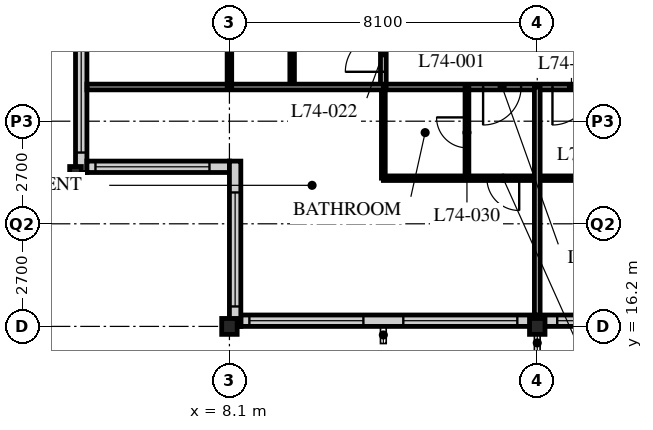
"""IFC4 building model, lengths in metres.
Left out: names, types, materials, properties, quantities, classifications, styles, units other than length and angle.
Written with IfcOpenShell. Run it as: python <this file> out.ifc"""

import sys

from ifc_helpers import new_model, si_unit, direction, frame, frame_2d, origin, origin_2d, place, context, subcontext, project, spatial, rectangle, i_section, extrude, element, fill, save


model = new_model("IFC4")
c1 = context("Model", 3, precision=1e-05, world=origin(), true_north=direction((0.0, 1.0)))
c2 = subcontext(c1, "Body", "Model", "MODEL_VIEW")
j1 = project(units=[si_unit("LENGTHUNIT", "METRE"), si_unit("PLANEANGLEUNIT", "RADIAN")], contexts=[c1])
p1 = place(None, origin())
s1 = spatial("IfcSite", under=j1, at=p1, CompositionType="ELEMENT")
p2 = place(p1, origin())
s2 = spatial("IfcBuilding", under=s1, at=p2, CompositionType="ELEMENT")
p3 = place(p2, frame((0.0, 0.0, 289.2)))
s3 = spatial("IfcBuildingStorey", under=s2, at=p3, CompositionType="ELEMENT", Elevation=289.2)
p4 = place(p3, frame((4.05, 20.25, 0.0), z_axis=(0.0, 0.0, 1.0), x_axis=(1.0, 0.0, 0.0)))
e1 = element("IfcColumn", 1, at=p4, inside=s3, PredefinedType="COLUMN", context=c2, shape_type="SweptSolid", body=[
    extrude(i_section(OverallWidth=0.307, OverallDepth=0.314, WebThickness=0.012, FlangeThickness=0.019, FilletRadius=0.015, at=origin_2d()), origin(), (0.0, 0.0, 1.0), 3.9),
])
for number, where, z_axis, x_axis in (
    (2, (8.1, 16.2, 0.0), (0.0, 0.0, 1.0), (1.0, 0.0, 0.0)),
    (3, (16.2, 16.2, 0.0), (0.0, 0.0, 1.0), (1.0, 0.0, 0.0)),
):
    element("IfcColumn", number, at=place(p3, frame(where, z_axis=z_axis, x_axis=x_axis)), inside=s3, PredefinedType="COLUMN", context=c2, shape_type="SweptSolid", body=[
        extrude(i_section(OverallWidth=0.407, OverallDepth=0.419, WebThickness=0.031, FlangeThickness=0.049, FilletRadius=0.015, at=origin_2d()), origin(), (0.0, 0.0, 1.0), 3.9),
    ])
p5 = place(p3, frame((8.4, 16.35, 0.0), z_axis=(0.0, 0.0, 1.0), x_axis=(1.0, 0.0, 0.0)))
e4 = element("IfcWall", 4, at=p5, inside=s3, PredefinedType="SOLIDWALL", context=c2, shape_type="SweptSolid", body=[
    extrude(rectangle(XDim=40.2, YDim=0.3, at=frame_2d((20.1, 0.0))), origin(), (0.0, 0.0, 1.0), 3.69),
])
p6 = place(p5, frame((0.225, 0.0, 0.6)))
e5 = element("IfcOpeningElement", 5, at=p6, cuts=e4, PredefinedType="OPENING", context=c2, shape_type="SweptSolid", body=[
    extrude(rectangle(XDim=3.0, YDim=2.4, at=frame_2d((1.5, 1.2))), frame((0.0, 0.16, 0.0), z_axis=(0.0, -1.0, 0.0), x_axis=(1.0, 0.0, 0.0)), (0.0, 0.0, 1.0), 0.32),
])
p7 = place(p5, frame((4.275, 0.0, 0.6)))
e6 = element("IfcOpeningElement", 6, at=p7, cuts=e4, PredefinedType="OPENING", context=c2, shape_type="SweptSolid", body=[
    extrude(rectangle(XDim=3.0, YDim=2.4, at=frame_2d((1.5, 1.2))), frame((0.0, 0.16, 0.0), z_axis=(0.0, -1.0, 0.0), x_axis=(1.0, 0.0, 0.0)), (0.0, 0.0, 1.0), 0.32),
])
p8 = place(p5, frame((8.325, 0.0, 0.6)))
e7 = element("IfcOpeningElement", 7, at=p8, cuts=e4, PredefinedType="OPENING", context=c2, shape_type="SweptSolid", body=[
    extrude(rectangle(XDim=3.0, YDim=2.4, at=frame_2d((1.5, 1.2))), frame((0.0, 0.16, 0.0), z_axis=(0.0, -1.0, 0.0), x_axis=(1.0, 0.0, 0.0)), (0.0, 0.0, 1.0), 0.32),
])
p9 = place(p5, frame((12.375, 0.0, 0.6)))
e8 = element("IfcOpeningElement", 8, at=p9, cuts=e4, PredefinedType="OPENING", context=c2, shape_type="SweptSolid", body=[
    extrude(rectangle(XDim=3.0, YDim=2.4, at=frame_2d((1.5, 1.2))), frame((0.0, 0.16, 0.0), z_axis=(0.0, -1.0, 0.0), x_axis=(1.0, 0.0, 0.0)), (0.0, 0.0, 1.0), 0.32),
])
p10 = place(p5, frame((16.425, 0.0, 0.6)))
e9 = element("IfcOpeningElement", 9, at=p10, cuts=e4, PredefinedType="OPENING", context=c2, shape_type="SweptSolid", body=[
    extrude(rectangle(XDim=3.0, YDim=2.4, at=frame_2d((1.5, 1.2))), frame((0.0, 0.16, 0.0), z_axis=(0.0, -1.0, 0.0), x_axis=(1.0, 0.0, 0.0)), (0.0, 0.0, 1.0), 0.32),
])
p11 = place(p5, frame((20.475, 0.0, 0.6)))
e10 = element("IfcOpeningElement", 10, at=p11, cuts=e4, PredefinedType="OPENING", context=c2, shape_type="SweptSolid", body=[
    extrude(rectangle(XDim=3.0, YDim=2.4, at=frame_2d((1.5, 1.2))), frame((0.0, 0.16, 0.0), z_axis=(0.0, -1.0, 0.0), x_axis=(1.0, 0.0, 0.0)), (0.0, 0.0, 1.0), 0.32),
])
p12 = place(p5, frame((24.525, 0.0, 0.6)))
e11 = element("IfcOpeningElement", 11, at=p12, cuts=e4, PredefinedType="OPENING", context=c2, shape_type="SweptSolid", body=[
    extrude(rectangle(XDim=3.0, YDim=2.4, at=frame_2d((1.5, 1.2))), frame((0.0, 0.16, 0.0), z_axis=(0.0, -1.0, 0.0), x_axis=(1.0, 0.0, 0.0)), (0.0, 0.0, 1.0), 0.32),
])
p13 = place(p5, frame((28.575, 0.0, 0.6)))
e12 = element("IfcOpeningElement", 12, at=p13, cuts=e4, PredefinedType="OPENING", context=c2, shape_type="SweptSolid", body=[
    extrude(rectangle(XDim=3.0, YDim=2.4, at=frame_2d((1.5, 1.2))), frame((0.0, 0.16, 0.0), z_axis=(0.0, -1.0, 0.0), x_axis=(1.0, 0.0, 0.0)), (0.0, 0.0, 1.0), 0.32),
])
p14 = place(p5, frame((32.625, 0.0, 0.6)))
e13 = element("IfcOpeningElement", 13, at=p14, cuts=e4, PredefinedType="OPENING", context=c2, shape_type="SweptSolid", body=[
    extrude(rectangle(XDim=3.0, YDim=2.4, at=frame_2d((1.5, 1.2))), frame((0.0, 0.16, 0.0), z_axis=(0.0, -1.0, 0.0), x_axis=(1.0, 0.0, 0.0)), (0.0, 0.0, 1.0), 0.32),
])
p15 = place(p5, frame((36.675, 0.0, 0.6)))
e14 = element("IfcOpeningElement", 14, at=p15, cuts=e4, PredefinedType="OPENING", context=c2, shape_type="SweptSolid", body=[
    extrude(rectangle(XDim=3.0, YDim=2.4, at=frame_2d((1.5, 1.2))), frame((0.0, 0.16, 0.0), z_axis=(0.0, -1.0, 0.0), x_axis=(1.0, 0.0, 0.0)), (0.0, 0.0, 1.0), 0.32),
])
p16 = place(p3, frame((4.2, 24.6, 0.0), z_axis=(0.0, 0.0, 1.0), x_axis=(0.0, -1.0, 0.0)))
e15 = element("IfcWall", 15, at=p16, inside=s3, PredefinedType="SOLIDWALL", context=c2, shape_type="SweptSolid", body=[
    extrude(rectangle(XDim=4.35, YDim=0.3, at=frame_2d((2.175, 0.0))), origin(), (0.0, 0.0, 1.0), 3.69),
])
p17 = place(p16, frame((0.825, 0.0, 0.6)))
e16 = element("IfcOpeningElement", 16, at=p17, cuts=e15, PredefinedType="OPENING", context=c2, shape_type="SweptSolid", body=[
    extrude(rectangle(XDim=3.0, YDim=2.3, at=frame_2d((1.5, 1.15))), frame((0.0, 0.16, 0.0), z_axis=(0.0, -1.0, 0.0), x_axis=(1.0, 0.0, 0.0)), (0.0, 0.0, 1.0), 0.32),
])
p18 = place(p3, frame((4.35, 20.4, 0.0), z_axis=(0.0, 0.0, 1.0), x_axis=(1.0, 0.0, 0.0)))
e17 = element("IfcWall", 17, at=p18, inside=s3, PredefinedType="SOLIDWALL", context=c2, shape_type="SweptSolid", body=[
    extrude(rectangle(XDim=3.75, YDim=0.3, at=frame_2d((1.875, 0.0))), origin(), (0.0, 0.0, 1.0), 3.69),
])
p19 = place(p18, frame((0.225, 0.0, 0.6)))
e18 = element("IfcOpeningElement", 18, at=p19, cuts=e17, PredefinedType="OPENING", context=c2, shape_type="SweptSolid", body=[
    extrude(rectangle(XDim=3.0, YDim=2.3, at=frame_2d((1.5, 1.15))), frame((0.0, 0.16, 0.0), z_axis=(0.0, -1.0, 0.0), x_axis=(1.0, 0.0, 0.0)), (0.0, 0.0, 1.0), 0.32),
])
p20 = place(p3, frame((8.25, 20.55, 0.0), z_axis=(0.0, 0.0, 1.0), x_axis=(0.0, -1.0, 0.0)))
e19 = element("IfcWall", 19, at=p20, inside=s3, PredefinedType="SOLIDWALL", context=c2, shape_type="SweptSolid", body=[
    extrude(rectangle(XDim=4.35, YDim=0.3, at=frame_2d((2.175, 0.0))), origin(), (0.0, 0.0, 1.0), 3.69),
])
p21 = place(p20, frame((0.825, 0.0, 0.6)))
e20 = element("IfcOpeningElement", 20, at=p21, cuts=e19, PredefinedType="OPENING", context=c2, shape_type="SweptSolid", body=[
    extrude(rectangle(XDim=3.0, YDim=2.3, at=frame_2d((1.5, 1.15))), frame((0.0, 0.16, 0.0), z_axis=(0.0, -1.0, 0.0), x_axis=(1.0, 0.0, 0.0)), (0.0, 0.0, 1.0), 0.32),
])
p22 = place(p3, frame((12.15, 22.5, 0.0), z_axis=(0.0, 0.0, 1.0), x_axis=(1.0, 0.0, 0.0)))
e21 = element("IfcWall", 21, at=p22, inside=s3, PredefinedType="PARTITIONING", context=c2, shape_type="SweptSolid", body=[
    extrude(rectangle(XDim=24.3, YDim=0.15, at=frame_2d((12.15, 0.0))), origin(), (0.0, 0.0, 1.0), 3.69),
])
p23 = place(p22, frame((4.45, 0.0, 0.0)))
e22 = element("IfcOpeningElement", 22, at=p23, cuts=e21, PredefinedType="OPENING", context=c2, shape_type="SweptSolid", body=[
    extrude(rectangle(XDim=1.0, YDim=2.1, at=frame_2d((0.5, 1.05))), frame((0.0, 0.085, 0.0), z_axis=(0.0, -1.0, 0.0), x_axis=(1.0, 0.0, 0.0)), (0.0, 0.0, 1.0), 0.17),
])
p24 = place(p22, frame((22.6, 0.0, 0.0)))
e23 = element("IfcOpeningElement", 23, at=p24, cuts=e21, PredefinedType="OPENING", context=c2, shape_type="SweptSolid", body=[
    extrude(rectangle(XDim=1.0, YDim=2.1, at=frame_2d((0.5, 1.05))), frame((0.0, 0.085, 0.0), z_axis=(0.0, -1.0, 0.0), x_axis=(1.0, 0.0, 0.0)), (0.0, 0.0, 1.0), 0.17),
])
p25 = place(p22, frame((2.625, 0.0, 0.0)))
e24 = element("IfcOpeningElement", 24, at=p25, cuts=e21, PredefinedType="OPENING", context=c2, shape_type="SweptSolid", body=[
    extrude(rectangle(XDim=1.0, YDim=2.1, at=frame_2d((0.5, 1.05))), frame((0.0, 0.085, 0.0), z_axis=(0.0, -1.0, 0.0), x_axis=(1.0, 0.0, 0.0)), (0.0, 0.0, 1.0), 0.17),
])
p26 = place(p3, frame((12.15, 22.5, 0.0), z_axis=(0.0, 0.0, 1.0), x_axis=(0.0, 1.0, 0.0)))
e25 = element("IfcWall", 25, at=p26, inside=s3, PredefinedType="PARTITIONING", context=c2, shape_type="SweptSolid", body=[
    extrude(rectangle(XDim=26.1, YDim=0.15, at=frame_2d((13.05, 0.0))), origin(), (0.0, 0.0, 1.0), 3.69),
])
p27 = place(p26, frame((0.4, 0.0, 0.0)))
e26 = element("IfcOpeningElement", 26, at=p27, cuts=e25, PredefinedType="OPENING", context=c2, shape_type="SweptSolid", body=[
    extrude(rectangle(XDim=1.0, YDim=2.1, at=frame_2d((0.5, 1.05))), frame((0.0, 0.085, 0.0), z_axis=(0.0, -1.0, 0.0), x_axis=(1.0, 0.0, 0.0)), (0.0, 0.0, 1.0), 0.17),
])
p28 = place(p3, frame((9.75, 22.5, 0.0), z_axis=(0.0, 0.0, 1.0), x_axis=(0.0, 1.0, 0.0)))
e27 = element("IfcWall", 27, at=p28, inside=s3, PredefinedType="PARTITIONING", context=c2, shape_type="SweptSolid", body=[
    extrude(rectangle(XDim=26.1, YDim=0.12, at=frame_2d((13.05, 0.0))), origin(), (0.0, 0.0, 1.0), 3.69),
])
p29 = place(p28, frame((0.975, 0.0, 0.0)))
e28 = element("IfcOpeningElement", 28, at=p29, cuts=e27, PredefinedType="OPENING", context=c2, shape_type="SweptSolid", body=[
    extrude(rectangle(XDim=0.85, YDim=2.1, at=frame_2d((0.425, 1.05))), frame((0.0, 0.07, 0.0), z_axis=(0.0, -1.0, 0.0), x_axis=(1.0, 0.0, 0.0)), (0.0, 0.0, 1.0), 0.14),
])
p30 = place(p28, frame((10.225, 0.0, 0.0)))
e29 = element("IfcOpeningElement", 29, at=p30, cuts=e27, PredefinedType="OPENING", context=c2, shape_type="SweptSolid", body=[
    extrude(rectangle(XDim=0.85, YDim=2.1, at=frame_2d((0.425, 1.05))), frame((0.0, 0.07, 0.0), z_axis=(0.0, -1.0, 0.0), x_axis=(1.0, 0.0, 0.0)), (0.0, 0.0, 1.0), 0.14),
])
p31 = place(p28, frame((14.275, 0.0, 0.0)))
e30 = element("IfcOpeningElement", 30, at=p31, cuts=e27, PredefinedType="OPENING", context=c2, shape_type="SweptSolid", body=[
    extrude(rectangle(XDim=0.85, YDim=2.1, at=frame_2d((0.425, 1.05))), frame((0.0, 0.07, 0.0), z_axis=(0.0, -1.0, 0.0), x_axis=(1.0, 0.0, 0.0)), (0.0, 0.0, 1.0), 0.14),
])
p32 = place(p28, frame((18.325, 0.0, 0.0)))
e31 = element("IfcOpeningElement", 31, at=p32, cuts=e27, PredefinedType="OPENING", context=c2, shape_type="SweptSolid", body=[
    extrude(rectangle(XDim=0.85, YDim=2.1, at=frame_2d((0.425, 1.05))), frame((0.0, 0.07, 0.0), z_axis=(0.0, -1.0, 0.0), x_axis=(1.0, 0.0, 0.0)), (0.0, 0.0, 1.0), 0.14),
])
p33 = place(p28, frame((22.375, 0.0, 0.0)))
e32 = element("IfcOpeningElement", 32, at=p33, cuts=e27, PredefinedType="OPENING", context=c2, shape_type="SweptSolid", body=[
    extrude(rectangle(XDim=0.85, YDim=2.1, at=frame_2d((0.425, 1.05))), frame((0.0, 0.07, 0.0), z_axis=(0.0, -1.0, 0.0), x_axis=(1.0, 0.0, 0.0)), (0.0, 0.0, 1.0), 0.14),
])
p34 = place(p3, frame((12.15, 20.1, 0.0), z_axis=(0.0, 0.0, 1.0), x_axis=(1.0, 0.0, 0.0)))
e33 = element("IfcWall", 33, at=p34, inside=s3, PredefinedType="PARTITIONING", context=c2, shape_type="SweptSolid", body=[
    extrude(rectangle(XDim=20.25, YDim=0.12, at=frame_2d((10.125, 0.0))), origin(), (0.0, 0.0, 1.0), 3.69),
])
p35 = place(p34, frame((5.025, 0.0, 0.0)))
e34 = element("IfcOpeningElement", 34, at=p35, cuts=e33, PredefinedType="OPENING", context=c2, shape_type="SweptSolid", body=[
    extrude(rectangle(XDim=0.85, YDim=2.1, at=frame_2d((0.425, 1.05))), frame((0.0, 0.07, 0.0), z_axis=(0.0, -1.0, 0.0), x_axis=(1.0, 0.0, 0.0)), (0.0, 0.0, 1.0), 0.14),
])
p36 = place(p34, frame((12.475, 0.0, 0.0)))
e35 = element("IfcOpeningElement", 35, at=p36, cuts=e33, PredefinedType="OPENING", context=c2, shape_type="SweptSolid", body=[
    extrude(rectangle(XDim=0.85, YDim=2.1, at=frame_2d((0.425, 1.05))), frame((0.0, 0.07, 0.0), z_axis=(0.0, -1.0, 0.0), x_axis=(1.0, 0.0, 0.0)), (0.0, 0.0, 1.0), 0.14),
])
p37 = place(p34, frame((16.525, 0.0, 0.0)))
e36 = element("IfcOpeningElement", 36, at=p37, cuts=e33, PredefinedType="OPENING", context=c2, shape_type="SweptSolid", body=[
    extrude(rectangle(XDim=0.85, YDim=2.1, at=frame_2d((0.425, 1.05))), frame((0.0, 0.07, 0.0), z_axis=(0.0, -1.0, 0.0), x_axis=(1.0, 0.0, 0.0)), (0.0, 0.0, 1.0), 0.14),
])
p38 = place(p34, frame((2.725, 0.0, 0.0)))
e37 = element("IfcOpeningElement", 37, at=p38, cuts=e33, PredefinedType="OPENING", context=c2, shape_type="SweptSolid", body=[
    extrude(rectangle(XDim=0.85, YDim=2.1, at=frame_2d((0.425, 1.05))), frame((0.0, 0.07, 0.0), z_axis=(0.0, -1.0, 0.0), x_axis=(1.0, 0.0, 0.0)), (0.0, 0.0, 1.0), 0.14),
])
p39 = place(p3, frame((14.35, 22.5, 0.0), z_axis=(0.0, 0.0, 1.0), x_axis=(0.0, -1.0, 0.0)))
e38 = element("IfcWall", 38, at=p39, inside=s3, PredefinedType="PARTITIONING", context=c2, shape_type="SweptSolid", body=[
    extrude(rectangle(XDim=2.4, YDim=0.1, at=frame_2d((1.2, 0.0))), origin(), (0.0, 0.0, 1.0), 3.69),
])
p40 = place(p39, frame((0.8, 0.0, 0.0)))
e39 = element("IfcOpeningElement", 39, at=p40, cuts=e38, PredefinedType="OPENING", context=c2, shape_type="SweptSolid", body=[
    extrude(rectangle(XDim=0.8, YDim=2.1, at=frame_2d((0.4, 1.05))), frame((0.0, 0.06, 0.0), z_axis=(0.0, -1.0, 0.0), x_axis=(1.0, 0.0, 0.0)), (0.0, 0.0, 1.0), 0.12),
])
p41 = place(p3, frame((12.15, 22.5, 0.0), z_axis=(0.0, 0.0, 1.0), x_axis=(0.0, -1.0, 0.0)))
e40 = element("IfcWall", 40, at=p41, inside=s3, PredefinedType="PARTITIONING", context=c2, shape_type="SweptSolid", body=[
    extrude(rectangle(XDim=2.4, YDim=0.1, at=frame_2d((1.2, 0.0))), origin(), (0.0, 0.0, 1.0), 3.69),
])
p42 = place(p3, frame((4.35, 22.5, 0.0), z_axis=(0.0, 0.0, 1.0), x_axis=(1.0, 0.0, 0.0)))
e41 = element("IfcWall", 41, at=p42, inside=s3, PredefinedType="PARTITIONING", context=c2, shape_type="SweptSolid", body=[
    extrude(rectangle(XDim=7.8, YDim=0.15, at=frame_2d((3.9, 0.0))), origin(), (0.0, 0.0, 1.0), 3.69),
])
p43 = place(p3, frame((16.2, 22.5, 0.0), z_axis=(0.0, 0.0, 1.0), x_axis=(0.0, -1.0, 0.0)))
e42 = element("IfcWall", 42, at=p43, inside=s3, PredefinedType="PARTITIONING", context=c2, shape_type="SweptSolid", body=[
    extrude(rectangle(XDim=6.0, YDim=0.15, at=frame_2d((3.0, 0.0))), origin(), (0.0, 0.0, 1.0), 3.078),
])
p44 = place(p3, frame((8.1, 22.5, 0.0), z_axis=(0.0, 0.0, 1.0), x_axis=(0.0, 1.0, 0.0)))
e43 = element("IfcWall", 43, at=p44, inside=s3, PredefinedType="PARTITIONING", context=c2, shape_type="SweptSolid", body=[
    extrude(rectangle(XDim=1.597, YDim=0.12, at=frame_2d((0.798, 0.0))), origin(), (0.0, 0.0, 1.0), 3.078),
])
p45 = place(p6, origin())
e44 = element("IfcWindow", 44, at=p45, inside=s3, PartitioningType="SINGLE_PANEL", PredefinedType="WINDOW", context=c2, shape_type="SweptSolid", body=[
    extrude(rectangle(XDim=3.0, YDim=2.4, at=frame_2d((1.5, 1.2))), frame((0.0, 0.03, 0.0), z_axis=(0.0, -1.0, 0.0), x_axis=(1.0, 0.0, 0.0)), (0.0, 0.0, 1.0), 0.06),
])
fill(e5, e44)
p46 = place(p7, origin())
e45 = element("IfcWindow", 45, at=p46, inside=s3, PartitioningType="SINGLE_PANEL", PredefinedType="WINDOW", context=c2, shape_type="SweptSolid", body=[
    extrude(rectangle(XDim=3.0, YDim=2.4, at=frame_2d((1.5, 1.2))), frame((0.0, 0.03, 0.0), z_axis=(0.0, -1.0, 0.0), x_axis=(1.0, 0.0, 0.0)), (0.0, 0.0, 1.0), 0.06),
])
fill(e6, e45)
p47 = place(p8, origin())
e46 = element("IfcWindow", 46, at=p47, inside=s3, PartitioningType="SINGLE_PANEL", PredefinedType="WINDOW", context=c2, shape_type="SweptSolid", body=[
    extrude(rectangle(XDim=3.0, YDim=2.4, at=frame_2d((1.5, 1.2))), frame((0.0, 0.03, 0.0), z_axis=(0.0, -1.0, 0.0), x_axis=(1.0, 0.0, 0.0)), (0.0, 0.0, 1.0), 0.06),
])
fill(e7, e46)
p48 = place(p17, origin())
e47 = element("IfcWindow", 47, at=p48, inside=s3, PartitioningType="SINGLE_PANEL", PredefinedType="WINDOW", context=c2, shape_type="SweptSolid", body=[
    extrude(rectangle(XDim=3.0, YDim=2.3, at=frame_2d((1.5, 1.15))), frame((0.0, 0.03, 0.0), z_axis=(0.0, -1.0, 0.0), x_axis=(1.0, 0.0, 0.0)), (0.0, 0.0, 1.0), 0.06),
])
fill(e16, e47)
p49 = place(p19, origin())
e48 = element("IfcWindow", 48, at=p49, inside=s3, PartitioningType="SINGLE_PANEL", PredefinedType="WINDOW", context=c2, shape_type="SweptSolid", body=[
    extrude(rectangle(XDim=3.0, YDim=2.3, at=frame_2d((1.5, 1.15))), frame((0.0, 0.03, 0.0), z_axis=(0.0, -1.0, 0.0), x_axis=(1.0, 0.0, 0.0)), (0.0, 0.0, 1.0), 0.06),
])
fill(e18, e48)
p50 = place(p21, origin())
e49 = element("IfcWindow", 49, at=p50, inside=s3, PartitioningType="SINGLE_PANEL", PredefinedType="WINDOW", context=c2, shape_type="SweptSolid", body=[
    extrude(rectangle(XDim=3.0, YDim=2.3, at=frame_2d((1.5, 1.15))), frame((0.0, 0.03, 0.0), z_axis=(0.0, -1.0, 0.0), x_axis=(1.0, 0.0, 0.0)), (0.0, 0.0, 1.0), 0.06),
])
fill(e20, e49)
p51 = place(p23, origin())
e50 = element("IfcDoor", 50, at=p51, inside=s3, OperationType="SINGLE_SWING_RIGHT", PredefinedType="DOOR", context=c2, shape_type="SweptSolid", body=[
    extrude(rectangle(XDim=1.0, YDim=2.1, at=frame_2d((0.5, 1.05))), frame((0.0, 0.025, 0.0), z_axis=(0.0, -1.0, 0.0), x_axis=(1.0, 0.0, 0.0)), (0.0, 0.0, 1.0), 0.05),
])
fill(e22, e50)
p52 = place(p27, origin())
e51 = element("IfcDoor", 51, at=p52, inside=s3, OperationType="SINGLE_SWING_LEFT", PredefinedType="DOOR", context=c2, shape_type="SweptSolid", body=[
    extrude(rectangle(XDim=1.0, YDim=2.1, at=frame_2d((0.5, 1.05))), frame((0.0, 0.025, 0.0), z_axis=(0.0, -1.0, 0.0), x_axis=(1.0, 0.0, 0.0)), (0.0, 0.0, 1.0), 0.05),
])
fill(e26, e51)
p53 = place(p40, origin())
e52 = element("IfcDoor", 52, at=p53, inside=s3, OperationType="SINGLE_SWING_RIGHT", PredefinedType="DOOR", context=c2, shape_type="SweptSolid", body=[
    extrude(rectangle(XDim=0.8, YDim=2.1, at=frame_2d((0.4, 1.05))), frame((0.0, 0.025, 0.0), z_axis=(0.0, -1.0, 0.0), x_axis=(1.0, 0.0, 0.0)), (0.0, 0.0, 1.0), 0.05),
])
fill(e39, e52)
p54 = place(p25, origin())
e53 = element("IfcDoor", 53, at=p54, inside=s3, OperationType="SINGLE_SWING_RIGHT", PredefinedType="DOOR", context=c2, shape_type="SweptSolid", body=[
    extrude(rectangle(XDim=1.0, YDim=2.1, at=frame_2d((0.5, 1.05))), frame((0.0, 0.025, 0.0), z_axis=(0.0, -1.0, 0.0), x_axis=(1.0, 0.0, 0.0)), (0.0, 0.0, 1.0), 0.05),
])
fill(e24, e53)
p55 = place(p38, origin())
e54 = element("IfcDoor", 54, at=p55, inside=s3, OperationType="SINGLE_SWING_LEFT", PredefinedType="DOOR", context=c2, shape_type="SweptSolid", body=[
    extrude(rectangle(XDim=0.85, YDim=2.1, at=frame_2d((0.425, 1.05))), frame((0.0, 0.025, 0.0), z_axis=(0.0, -1.0, 0.0), x_axis=(1.0, 0.0, 0.0)), (0.0, 0.0, 1.0), 0.05),
])
fill(e37, e54)
save(model, sys.argv[1])
